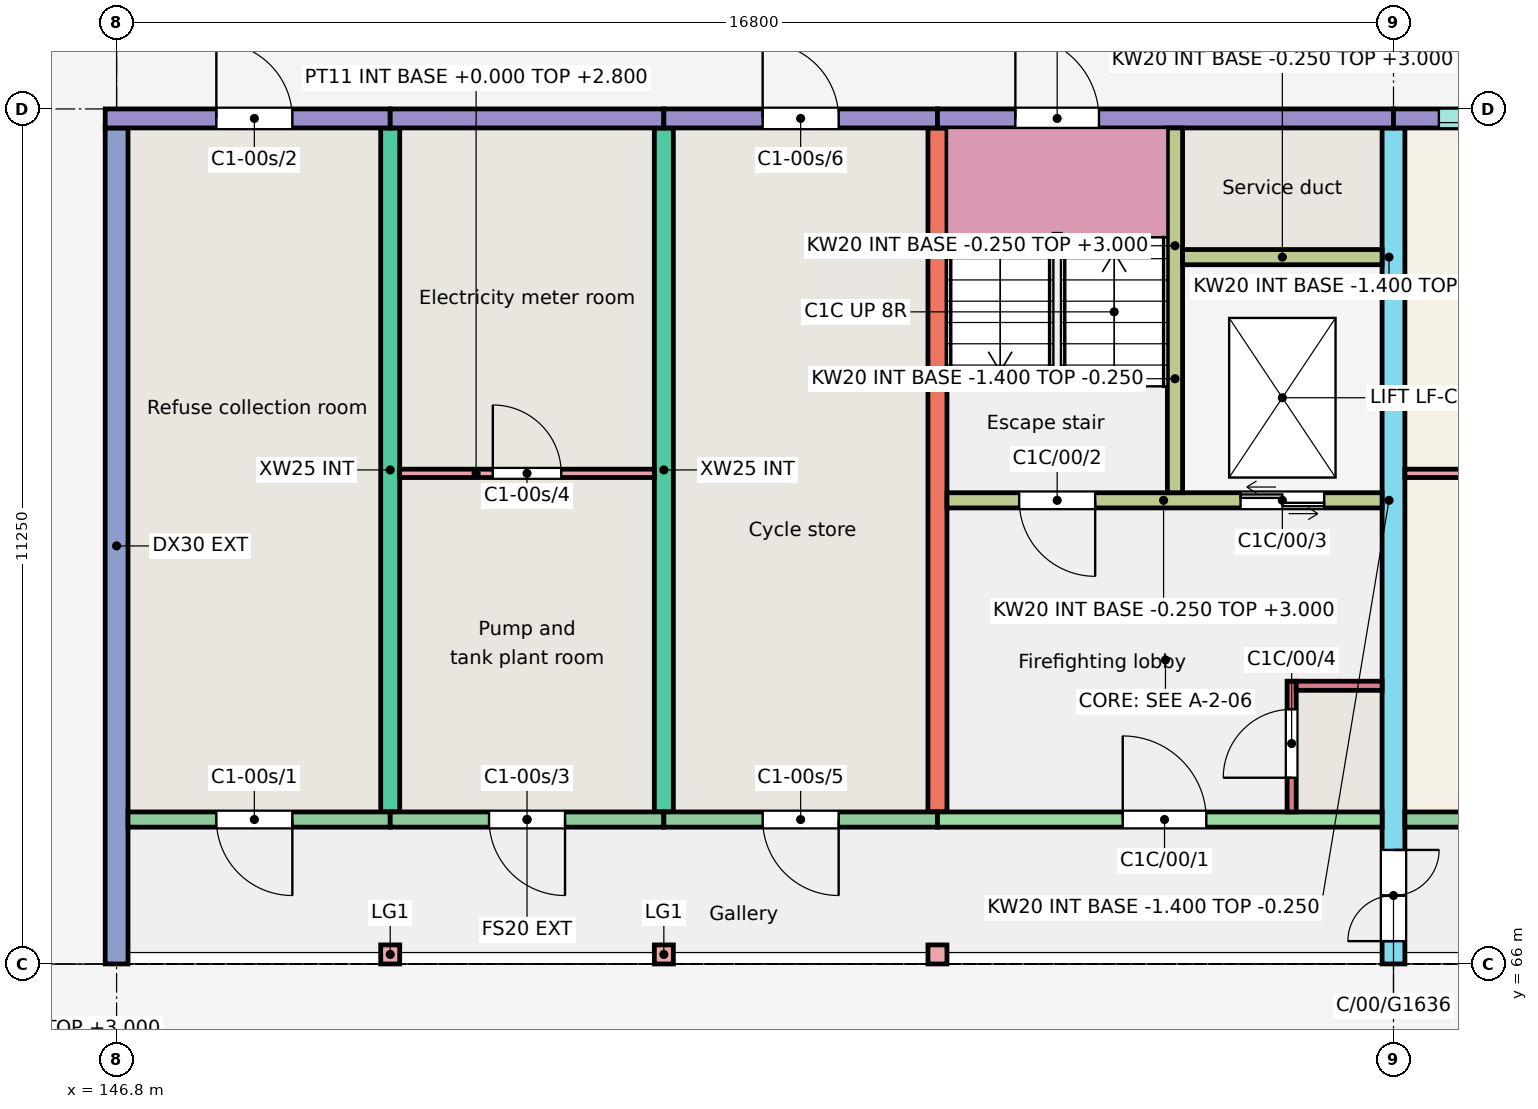
"""IFC4 building model, lengths in metres.
Left out: names, types, materials, properties, quantities, classifications, styles, units other than length and angle.
Written with IfcOpenShell. Run it as: python <this file> out.ifc"""

import sys

from ifc_helpers import new_model, si_unit, direction, frame, frame_2d, origin, origin_2d, place, context, subcontext, project, spatial, rectangle, extrude, element, fill, save


model = new_model("IFC4")
c1 = context("Model", 3, precision=1e-05, world=origin(), true_north=direction((0.0, 1.0)))
c2 = subcontext(c1, "Body", "Model", "MODEL_VIEW")
j1 = project(units=[si_unit("LENGTHUNIT", "METRE"), si_unit("PLANEANGLEUNIT", "RADIAN")], contexts=[c1])
p1 = place(None, origin())
s1 = spatial("IfcSite", under=j1, at=p1, CompositionType="ELEMENT")
p2 = place(p1, origin())
s2 = spatial("IfcBuilding", under=s1, at=p2, CompositionType="ELEMENT")
p3 = place(p2, origin())
s3 = spatial("IfcBuildingStorey", under=s2, at=p3, CompositionType="ELEMENT", Elevation=0.0)
p4 = place(p3, frame((146.8, 66.0, -0.25), z_axis=(0.0, 0.0, 1.0), x_axis=(0.0, 1.0, 0.0)))
e1 = element("IfcWall", 1, at=p4, inside=s3, PredefinedType="SHEAR", context=c2, shape_type="SweptSolid", body=[
    extrude(rectangle(XDim=11.0, YDim=0.3, at=frame_2d((5.5, 0.0))), origin(), (0.0, 0.0, 1.0), 3.25),
])
for number, where, z_axis, x_axis in (
    (2, (150.4, 68.0, -0.25), (0.0, 0.0, 1.0), (0.0, 1.0, 0.0)),
    (3, (154.0, 68.0, -0.25), (0.0, 0.0, 1.0), (0.0, 1.0, 0.0)),
    (4, (157.6, 68.0, -0.25), (0.0, 0.0, 1.0), (0.0, 1.0, 0.0)),
):
    element("IfcWall", number, at=place(p3, frame(where, z_axis=z_axis, x_axis=x_axis)), inside=s3, PredefinedType="SHEAR", context=c2, shape_type="SweptSolid", body=[
        extrude(rectangle(XDim=9.0, YDim=0.25, at=frame_2d((4.5, 0.0))), origin(), (0.0, 0.0, 1.0), 3.25),
    ])
p5 = place(p3, frame((163.6, 66.0, -0.25), z_axis=(0.0, 0.0, 1.0), x_axis=(0.0, 1.0, 0.0)))
e5 = element("IfcWall", 5, at=p5, inside=s3, PredefinedType="SHEAR", context=c2, shape_type="SweptSolid", body=[
    extrude(rectangle(XDim=11.0, YDim=0.3, at=frame_2d((5.5, 0.0))), origin(), (0.0, 0.0, 1.0), 3.25),
])
p6 = place(p5, frame((0.3, 0.0, 0.25)))
e6 = element("IfcOpeningElement", 6, at=p6, cuts=e5, PredefinedType="OPENING", context=c2, shape_type="SweptSolid", body=[
    extrude(rectangle(XDim=1.2, YDim=2.1, at=frame_2d((0.6, 1.05))), frame((0.0, 0.16, 0.0), z_axis=(0.0, -1.0, 0.0), x_axis=(1.0, 0.0, 0.0)), (0.0, 0.0, 1.0), 0.32),
])
p7 = place(p3, frame((146.65, 77.125, -0.25), z_axis=(0.0, 0.0, 1.0), x_axis=(1.0, 0.0, 0.0)))
e7 = element("IfcWall", 7, at=p7, inside=s3, PredefinedType="SOLIDWALL", context=c2, shape_type="SweptSolid", body=[
    extrude(rectangle(XDim=3.75, YDim=0.25, at=frame_2d((1.875, 0.0))), origin(), (0.0, 0.0, 1.0), 3.25),
])
p8 = place(p7, frame((1.462, 0.0, 0.25)))
e8 = element("IfcOpeningElement", 8, at=p8, cuts=e7, PredefinedType="OPENING", context=c2, shape_type="SweptSolid", body=[
    extrude(rectangle(XDim=1.0, YDim=2.1, at=frame_2d((0.5, 1.05))), frame((0.0, 0.135, 0.0), z_axis=(0.0, -1.0, 0.0), x_axis=(1.0, 0.0, 0.0)), (0.0, 0.0, 1.0), 0.27),
])
p9 = place(p3, frame((146.95, 67.9, -0.25), z_axis=(0.0, 0.0, 1.0), x_axis=(1.0, 0.0, 0.0)))
e9 = element("IfcWall", 9, at=p9, inside=s3, PredefinedType="SOLIDWALL", context=c2, shape_type="SweptSolid", body=[
    extrude(rectangle(XDim=3.45, YDim=0.2, at=frame_2d((1.725, 0.0))), origin(), (0.0, 0.0, 1.0), 3.25),
])
p10 = place(p9, frame((1.163, 0.0, 0.25)))
e10 = element("IfcOpeningElement", 10, at=p10, cuts=e9, PredefinedType="OPENING", context=c2, shape_type="SweptSolid", body=[
    extrude(rectangle(XDim=1.0, YDim=2.1, at=frame_2d((0.5, 1.05))), frame((0.0, 0.11, 0.0), z_axis=(0.0, -1.0, 0.0), x_axis=(1.0, 0.0, 0.0)), (0.0, 0.0, 1.0), 0.22),
])
p11 = place(p3, frame((150.4, 77.125, -0.25), z_axis=(0.0, 0.0, 1.0), x_axis=(1.0, 0.0, 0.0)))
e11 = element("IfcWall", 11, at=p11, inside=s3, PredefinedType="SOLIDWALL", context=c2, shape_type="SweptSolid", body=[
    extrude(rectangle(XDim=3.6, YDim=0.25, at=frame_2d((1.8, 0.0))), origin(), (0.0, 0.0, 1.0), 3.25),
])
p12 = place(p3, frame((150.4, 67.9, -0.25), z_axis=(0.0, 0.0, 1.0), x_axis=(1.0, 0.0, 0.0)))
e12 = element("IfcWall", 12, at=p12, inside=s3, PredefinedType="SOLIDWALL", context=c2, shape_type="SweptSolid", body=[
    extrude(rectangle(XDim=3.6, YDim=0.2, at=frame_2d((1.8, 0.0))), origin(), (0.0, 0.0, 1.0), 3.25),
])
p13 = place(p12, frame((1.3, 0.0, 0.25)))
e13 = element("IfcOpeningElement", 13, at=p13, cuts=e12, PredefinedType="OPENING", context=c2, shape_type="SweptSolid", body=[
    extrude(rectangle(XDim=1.0, YDim=2.1, at=frame_2d((0.5, 1.05))), frame((0.0, 0.11, 0.0), z_axis=(0.0, -1.0, 0.0), x_axis=(1.0, 0.0, 0.0)), (0.0, 0.0, 1.0), 0.22),
])
p14 = place(p3, frame((154.0, 77.125, -0.25), z_axis=(0.0, 0.0, 1.0), x_axis=(1.0, 0.0, 0.0)))
e14 = element("IfcWall", 14, at=p14, inside=s3, PredefinedType="SOLIDWALL", context=c2, shape_type="SweptSolid", body=[
    extrude(rectangle(XDim=3.6, YDim=0.25, at=frame_2d((1.8, 0.0))), origin(), (0.0, 0.0, 1.0), 3.25),
])
p15 = place(p14, frame((1.3, 0.0, 0.25)))
e15 = element("IfcOpeningElement", 15, at=p15, cuts=e14, PredefinedType="OPENING", context=c2, shape_type="SweptSolid", body=[
    extrude(rectangle(XDim=1.0, YDim=2.1, at=frame_2d((0.5, 1.05))), frame((0.0, 0.135, 0.0), z_axis=(0.0, -1.0, 0.0), x_axis=(1.0, 0.0, 0.0)), (0.0, 0.0, 1.0), 0.27),
])
p16 = place(p3, frame((154.0, 67.9, -0.25), z_axis=(0.0, 0.0, 1.0), x_axis=(1.0, 0.0, 0.0)))
e16 = element("IfcWall", 16, at=p16, inside=s3, PredefinedType="SOLIDWALL", context=c2, shape_type="SweptSolid", body=[
    extrude(rectangle(XDim=3.6, YDim=0.2, at=frame_2d((1.8, 0.0))), origin(), (0.0, 0.0, 1.0), 3.25),
])
p17 = place(p16, frame((1.3, 0.0, 0.25)))
e17 = element("IfcOpeningElement", 17, at=p17, cuts=e16, PredefinedType="OPENING", context=c2, shape_type="SweptSolid", body=[
    extrude(rectangle(XDim=1.0, YDim=2.1, at=frame_2d((0.5, 1.05))), frame((0.0, 0.11, 0.0), z_axis=(0.0, -1.0, 0.0), x_axis=(1.0, 0.0, 0.0)), (0.0, 0.0, 1.0), 0.22),
])
p18 = place(p3, frame((157.6, 77.125, -0.25), z_axis=(0.0, 0.0, 1.0), x_axis=(1.0, 0.0, 0.0)))
e18 = element("IfcWall", 18, at=p18, inside=s3, PredefinedType="SOLIDWALL", context=c2, shape_type="SweptSolid", body=[
    extrude(rectangle(XDim=6.0, YDim=0.25, at=frame_2d((3.0, 0.0))), origin(), (0.0, 0.0, 1.0), 3.25),
])
p19 = place(p18, frame((1.025, 0.0, 0.25)))
e19 = element("IfcOpeningElement", 19, at=p19, cuts=e18, PredefinedType="OPENING", context=c2, shape_type="SweptSolid", body=[
    extrude(rectangle(XDim=1.1, YDim=2.1, at=frame_2d((0.55, 1.05))), frame((0.0, 0.135, 0.0), z_axis=(0.0, -1.0, 0.0), x_axis=(1.0, 0.0, 0.0)), (0.0, 0.0, 1.0), 0.27),
])
p20 = place(p3, frame((157.6, 67.9, -0.25), z_axis=(0.0, 0.0, 1.0), x_axis=(1.0, 0.0, 0.0)))
e20 = element("IfcWall", 20, at=p20, inside=s3, PredefinedType="SHEAR", context=c2, shape_type="SweptSolid", body=[
    extrude(rectangle(XDim=5.85, YDim=0.2, at=frame_2d((2.925, 0.0))), origin(), (0.0, 0.0, 1.0), 3.25),
])
p21 = place(p20, frame((2.438, 0.0, 0.25)))
e21 = element("IfcOpeningElement", 21, at=p21, cuts=e20, PredefinedType="OPENING", context=c2, shape_type="SweptSolid", body=[
    extrude(rectangle(XDim=1.1, YDim=2.1, at=frame_2d((0.55, 1.05))), frame((0.0, 0.11, 0.0), z_axis=(0.0, -1.0, 0.0), x_axis=(1.0, 0.0, 0.0)), (0.0, 0.0, 1.0), 0.22),
])
p22 = place(p3, frame((157.725, 72.1, -0.25), z_axis=(0.0, 0.0, 1.0), x_axis=(1.0, 0.0, 0.0)))
e22 = element("IfcWall", 22, at=p22, inside=s3, PredefinedType="SHEAR", context=c2, shape_type="SweptSolid", body=[
    extrude(rectangle(XDim=5.725, YDim=0.2, at=frame_2d((2.862, 0.0))), origin(), (0.0, 0.0, 1.0), 3.25),
])
p23 = place(p22, frame((0.95, 0.0, 0.25)))
e23 = element("IfcOpeningElement", 23, at=p23, cuts=e22, PredefinedType="OPENING", context=c2, shape_type="SweptSolid", body=[
    extrude(rectangle(XDim=1.0, YDim=2.1, at=frame_2d((0.5, 1.05))), frame((0.0, 0.11, 0.0), z_axis=(0.0, -1.0, 0.0), x_axis=(1.0, 0.0, 0.0)), (0.0, 0.0, 1.0), 0.22),
])
p24 = place(p22, frame((3.863, 0.0, 0.25)))
e24 = element("IfcOpeningElement", 24, at=p24, cuts=e22, PredefinedType="OPENING", context=c2, shape_type="SweptSolid", body=[
    extrude(rectangle(XDim=1.1, YDim=2.1, at=frame_2d((0.55, 1.05))), frame((0.0, 0.11, 0.0), z_axis=(0.0, -1.0, 0.0), x_axis=(1.0, 0.0, 0.0)), (0.0, 0.0, 1.0), 0.22),
])
p25 = place(p3, frame((160.725, 72.2, -0.25), z_axis=(0.0, 0.0, 1.0), x_axis=(0.0, 1.0, 0.0)))
e25 = element("IfcWall", 25, at=p25, inside=s3, PredefinedType="SHEAR", context=c2, shape_type="SweptSolid", body=[
    extrude(rectangle(XDim=4.8, YDim=0.2, at=frame_2d((2.4, 0.0))), origin(), (0.0, 0.0, 1.0), 3.25),
])
p26 = place(p3, frame((160.825, 75.3, -0.25), z_axis=(0.0, 0.0, 1.0), x_axis=(1.0, 0.0, 0.0)))
e26 = element("IfcWall", 26, at=p26, inside=s3, PredefinedType="SHEAR", context=c2, shape_type="SweptSolid", body=[
    extrude(rectangle(XDim=2.625, YDim=0.2, at=frame_2d((1.312, 0.0))), origin(), (0.0, 0.0, 1.0), 3.25),
])
p27 = place(p3, frame((162.26, 68.0, -0.25), z_axis=(0.0, 0.0, 1.0), x_axis=(0.0, 1.0, 0.0)))
e27 = element("IfcWall", 27, at=p27, inside=s3, PredefinedType="SHEAR", context=c2, shape_type="SweptSolid", body=[
    extrude(rectangle(XDim=1.72, YDim=0.12, at=frame_2d((0.86, 0.0))), origin(), (0.0, 0.0, 1.0), 3.25),
])
p28 = place(p27, frame((0.45, 0.0, 0.25)))
e28 = element("IfcOpeningElement", 28, at=p28, cuts=e27, PredefinedType="OPENING", context=c2, shape_type="SweptSolid", body=[
    extrude(rectangle(XDim=0.9, YDim=2.1, at=frame_2d((0.45, 1.05))), frame((0.0, 0.07, 0.0), z_axis=(0.0, -1.0, 0.0), x_axis=(1.0, 0.0, 0.0)), (0.0, 0.0, 1.0), 0.14),
])
p29 = place(p3, frame((162.32, 69.66, -0.25), z_axis=(0.0, 0.0, 1.0), x_axis=(1.0, 0.0, 0.0)))
e29 = element("IfcWall", 29, at=p29, inside=s3, PredefinedType="SHEAR", context=c2, shape_type="SweptSolid", body=[
    extrude(rectangle(XDim=1.13, YDim=0.12, at=frame_2d((0.565, 0.0))), origin(), (0.0, 0.0, 1.0), 3.25),
])
p30 = place(p3, frame((163.6, 77.125, -0.25), z_axis=(0.0, 0.0, 1.0), x_axis=(1.0, 0.0, 0.0)))
e30 = element("IfcWall", 30, at=p30, inside=s3, PredefinedType="SOLIDWALL", context=c2, shape_type="SweptSolid", body=[
    extrude(rectangle(XDim=3.6, YDim=0.25, at=frame_2d((1.8, 0.0))), origin(), (0.0, 0.0, 1.0), 3.25),
])
p31 = place(p30, frame((0.597, 0.0, 1.35)))
e31 = element("IfcOpeningElement", 31, at=p31, cuts=e30, PredefinedType="OPENING", context=c2, shape_type="SweptSolid", body=[
    extrude(rectangle(XDim=1.2, YDim=1.3, at=frame_2d((0.6, 0.65))), frame((0.0, 0.135, 0.0), z_axis=(0.0, -1.0, 0.0), x_axis=(1.0, 0.0, 0.0)), (0.0, 0.0, 1.0), 0.27),
])
p32 = place(p30, frame((2.344, 0.0, 0.25)))
e32 = element("IfcOpeningElement", 32, at=p32, cuts=e30, PredefinedType="OPENING", context=c2, shape_type="SweptSolid", body=[
    extrude(rectangle(XDim=1.0, YDim=2.1, at=frame_2d((0.5, 1.05))), frame((0.0, 0.135, 0.0), z_axis=(0.0, -1.0, 0.0), x_axis=(1.0, 0.0, 0.0)), (0.0, 0.0, 1.0), 0.27),
])
p33 = place(p3, frame((163.75, 67.9, -0.25), z_axis=(0.0, 0.0, 1.0), x_axis=(1.0, 0.0, 0.0)))
e33 = element("IfcWall", 33, at=p33, inside=s3, PredefinedType="SOLIDWALL", context=c2, shape_type="SweptSolid", body=[
    extrude(rectangle(XDim=3.45, YDim=0.2, at=frame_2d((1.725, 0.0))), origin(), (0.0, 0.0, 1.0), 3.25),
])
p34 = place(p33, frame((0.925, 0.0, 1.15)))
e34 = element("IfcOpeningElement", 34, at=p34, cuts=e33, PredefinedType="OPENING", context=c2, shape_type="SweptSolid", body=[
    extrude(rectangle(XDim=1.5, YDim=1.5, at=frame_2d((0.75, 0.75))), frame((0.0, 0.11, 0.0), z_axis=(0.0, -1.0, 0.0), x_axis=(1.0, 0.0, 0.0)), (0.0, 0.0, 1.0), 0.22),
])
for number, where, z_axis, x_axis in (
    (35, (150.4, 66.125, -0.25), (0.0, 0.0, 1.0), (1.0, 0.0, 0.0)),
    (36, (154.0, 66.125, -0.25), (0.0, 0.0, 1.0), (1.0, 0.0, 0.0)),
    (37, (157.6, 66.125, -0.25), (0.0, 0.0, 1.0), (1.0, 0.0, 0.0)),
):
    element("IfcColumn", number, at=place(p3, frame(where, z_axis=z_axis, x_axis=x_axis)), inside=s3, PredefinedType="COLUMN", context=c2, shape_type="SweptSolid", body=[
        extrude(rectangle(XDim=0.25, YDim=0.25, at=origin_2d()), origin(), (0.0, 0.0, 1.0), 3.25),
    ])
for number, where, z_axis, x_axis in (
    (38, (160.625, 72.1, -1.4), (0.0, 0.0, 1.0), (1.0, 0.0, 0.0)),
    (39, (160.625, 75.3, -1.4), (0.0, 0.0, 1.0), (1.0, 0.0, 0.0)),
):
    element("IfcWall", number, at=place(p3, frame(where, z_axis=z_axis, x_axis=x_axis)), inside=s3, PredefinedType="SHEAR", context=c2, shape_type="SweptSolid", body=[
        extrude(rectangle(XDim=2.975, YDim=0.2, at=frame_2d((1.488, 0.0))), origin(), (0.0, 0.0, 1.0), 1.15),
    ])
p35 = place(p3, frame((160.725, 72.2, -1.4), z_axis=(0.0, 0.0, 1.0), x_axis=(0.0, 1.0, 0.0)))
e40 = element("IfcWall", 40, at=p35, inside=s3, PredefinedType="SHEAR", context=c2, shape_type="SweptSolid", body=[
    extrude(rectangle(XDim=3.0, YDim=0.2, at=frame_2d((1.5, 0.0))), origin(), (0.0, 0.0, 1.0), 1.15),
])
p36 = place(p3, frame((163.525, 72.2, -1.4), z_axis=(0.0, 0.0, 1.0), x_axis=(0.0, 1.0, 0.0)))
e41 = element("IfcWall", 41, at=p36, inside=s3, PredefinedType="SHEAR", context=c2, shape_type="SweptSolid", body=[
    extrude(rectangle(XDim=3.0, YDim=0.15, at=frame_2d((1.5, 0.0))), origin(), (0.0, 0.0, 1.0), 1.15),
])
p37 = place(p3, frame((150.525, 72.455, 0.0), z_axis=(0.0, 0.0, 1.0), x_axis=(1.0, 0.0, 0.0)))
e42 = element("IfcWall", 42, at=p37, inside=s3, PredefinedType="PARTITIONING", context=c2, shape_type="SweptSolid", body=[
    extrude(rectangle(XDim=3.35, YDim=0.11, at=frame_2d((1.675, 0.0))), origin(), (0.0, 0.0, 1.0), 2.8),
])
p38 = place(p37, frame((1.225, 0.0, 0.0)))
e43 = element("IfcOpeningElement", 43, at=p38, cuts=e42, PredefinedType="OPENING", context=c2, shape_type="SweptSolid", body=[
    extrude(rectangle(XDim=0.9, YDim=2.1, at=frame_2d((0.45, 1.05))), frame((0.0, 0.065, 0.0), z_axis=(0.0, -1.0, 0.0), x_axis=(1.0, 0.0, 0.0)), (0.0, 0.0, 1.0), 0.13),
])
p39 = place(p3, frame((163.75, 72.455, 0.0), z_axis=(0.0, 0.0, 1.0), x_axis=(1.0, 0.0, 0.0)))
e44 = element("IfcWall", 44, at=p39, inside=s3, PredefinedType="PARTITIONING", context=c2, shape_type="SweptSolid", body=[
    extrude(rectangle(XDim=3.35, YDim=0.11, at=frame_2d((1.675, 0.0))), origin(), (0.0, 0.0, 1.0), 2.8),
])
p40 = place(p31, origin())
e45 = element("IfcWindow", 45, at=p40, inside=s3, PartitioningType="SINGLE_PANEL", PredefinedType="WINDOW", context=c2, shape_type="SweptSolid", body=[
    extrude(rectangle(XDim=1.2, YDim=1.3, at=frame_2d((0.6, 0.65))), frame((0.0, -0.025, 0.0), z_axis=(0.0, -1.0, 0.0), x_axis=(1.0, 0.0, 0.0)), (0.0, 0.0, 1.0), 0.06),
])
fill(e31, e45)
p41 = place(p10, origin())
e46 = element("IfcDoor", 46, at=p41, inside=s3, OperationType="SINGLE_SWING_RIGHT", PredefinedType="DOOR", context=c2, shape_type="SweptSolid", body=[
    extrude(rectangle(XDim=1.0, YDim=2.1, at=frame_2d((0.5, 1.05))), frame((0.0, 0.025, 0.0), z_axis=(0.0, -1.0, 0.0), x_axis=(1.0, 0.0, 0.0)), (0.0, 0.0, 1.0), 0.05),
])
fill(e10, e46)
p42 = place(p8, origin())
e47 = element("IfcDoor", 47, at=p42, inside=s3, OperationType="SINGLE_SWING_LEFT", PredefinedType="DOOR", context=c2, shape_type="SweptSolid", body=[
    extrude(rectangle(XDim=1.0, YDim=2.1, at=frame_2d((0.5, 1.05))), frame((0.0, 0.025, 0.0), z_axis=(0.0, -1.0, 0.0), x_axis=(1.0, 0.0, 0.0)), (0.0, 0.0, 1.0), 0.05),
])
fill(e8, e47)
p43 = place(p13, origin())
e48 = element("IfcDoor", 48, at=p43, inside=s3, OperationType="SINGLE_SWING_RIGHT", PredefinedType="DOOR", context=c2, shape_type="SweptSolid", body=[
    extrude(rectangle(XDim=1.0, YDim=2.1, at=frame_2d((0.5, 1.05))), frame((0.0, 0.025, 0.0), z_axis=(0.0, -1.0, 0.0), x_axis=(1.0, 0.0, 0.0)), (0.0, 0.0, 1.0), 0.05),
])
fill(e13, e48)
p44 = place(p38, origin())
e49 = element("IfcDoor", 49, at=p44, inside=s3, OperationType="SINGLE_SWING_LEFT", PredefinedType="DOOR", context=c2, shape_type="SweptSolid", body=[
    extrude(rectangle(XDim=0.9, YDim=2.1, at=frame_2d((0.45, 1.05))), frame((0.0, 0.025, 0.0), z_axis=(0.0, -1.0, 0.0), x_axis=(1.0, 0.0, 0.0)), (0.0, 0.0, 1.0), 0.05),
])
fill(e43, e49)
p45 = place(p17, origin())
e50 = element("IfcDoor", 50, at=p45, inside=s3, OperationType="SINGLE_SWING_RIGHT", PredefinedType="DOOR", context=c2, shape_type="SweptSolid", body=[
    extrude(rectangle(XDim=1.0, YDim=2.1, at=frame_2d((0.5, 1.05))), frame((0.0, 0.025, 0.0), z_axis=(0.0, -1.0, 0.0), x_axis=(1.0, 0.0, 0.0)), (0.0, 0.0, 1.0), 0.05),
])
fill(e17, e50)
p46 = place(p15, origin())
e51 = element("IfcDoor", 51, at=p46, inside=s3, OperationType="SINGLE_SWING_LEFT", PredefinedType="DOOR", context=c2, shape_type="SweptSolid", body=[
    extrude(rectangle(XDim=1.0, YDim=2.1, at=frame_2d((0.5, 1.05))), frame((0.0, 0.025, 0.0), z_axis=(0.0, -1.0, 0.0), x_axis=(1.0, 0.0, 0.0)), (0.0, 0.0, 1.0), 0.05),
])
fill(e15, e51)
p47 = place(p21, origin())
e52 = element("IfcDoor", 52, at=p47, inside=s3, OperationType="SINGLE_SWING_LEFT", PredefinedType="DOOR", context=c2, shape_type="SweptSolid", body=[
    extrude(rectangle(XDim=1.1, YDim=2.1, at=frame_2d((0.55, 1.05))), frame((0.0, 0.025, 0.0), z_axis=(0.0, -1.0, 0.0), x_axis=(1.0, 0.0, 0.0)), (0.0, 0.0, 1.0), 0.05),
])
fill(e21, e52)
p48 = place(p23, origin())
e53 = element("IfcDoor", 53, at=p48, inside=s3, OperationType="SINGLE_SWING_RIGHT", PredefinedType="DOOR", context=c2, shape_type="SweptSolid", body=[
    extrude(rectangle(XDim=1.0, YDim=2.1, at=frame_2d((0.5, 1.05))), frame((0.0, 0.025, 0.0), z_axis=(0.0, -1.0, 0.0), x_axis=(1.0, 0.0, 0.0)), (0.0, 0.0, 1.0), 0.05),
])
fill(e23, e53)
p49 = place(p24, origin())
e54 = element("IfcDoor", 54, at=p49, inside=s3, OperationType="DOUBLE_DOOR_SLIDING", PredefinedType="DOOR", context=c2, shape_type="SweptSolid", body=[
    extrude(rectangle(XDim=1.1, YDim=2.1, at=frame_2d((0.55, 1.05))), frame((0.0, 0.025, 0.0), z_axis=(0.0, -1.0, 0.0), x_axis=(1.0, 0.0, 0.0)), (0.0, 0.0, 1.0), 0.05),
])
fill(e24, e54)
p50 = place(p28, origin())
e55 = element("IfcDoor", 55, at=p50, inside=s3, OperationType="SINGLE_SWING_LEFT", PredefinedType="DOOR", context=c2, shape_type="SweptSolid", body=[
    extrude(rectangle(XDim=0.9, YDim=2.1, at=frame_2d((0.45, 1.05))), frame((0.0, 0.025, 0.0), z_axis=(0.0, -1.0, 0.0), x_axis=(1.0, 0.0, 0.0)), (0.0, 0.0, 1.0), 0.05),
])
fill(e28, e55)
p51 = place(p19, origin())
e56 = element("IfcDoor", 56, at=p51, inside=s3, OperationType="SINGLE_SWING_LEFT", PredefinedType="DOOR", context=c2, shape_type="SweptSolid", body=[
    extrude(rectangle(XDim=1.1, YDim=2.1, at=frame_2d((0.55, 1.05))), frame((0.0, 0.025, 0.0), z_axis=(0.0, -1.0, 0.0), x_axis=(1.0, 0.0, 0.0)), (0.0, 0.0, 1.0), 0.05),
])
fill(e19, e56)
p52 = place(p6, origin())
e57 = element("IfcDoor", 57, at=p52, inside=s3, OperationType="DOUBLE_DOOR_SINGLE_SWING", PredefinedType="DOOR", context=c2, shape_type="SweptSolid", body=[
    extrude(rectangle(XDim=1.2, YDim=2.1, at=frame_2d((0.6, 1.05))), frame((0.0, 0.025, 0.0), z_axis=(0.0, -1.0, 0.0), x_axis=(1.0, 0.0, 0.0)), (0.0, 0.0, 1.0), 0.05),
])
fill(e6, e57)
save(model, sys.argv[1])
